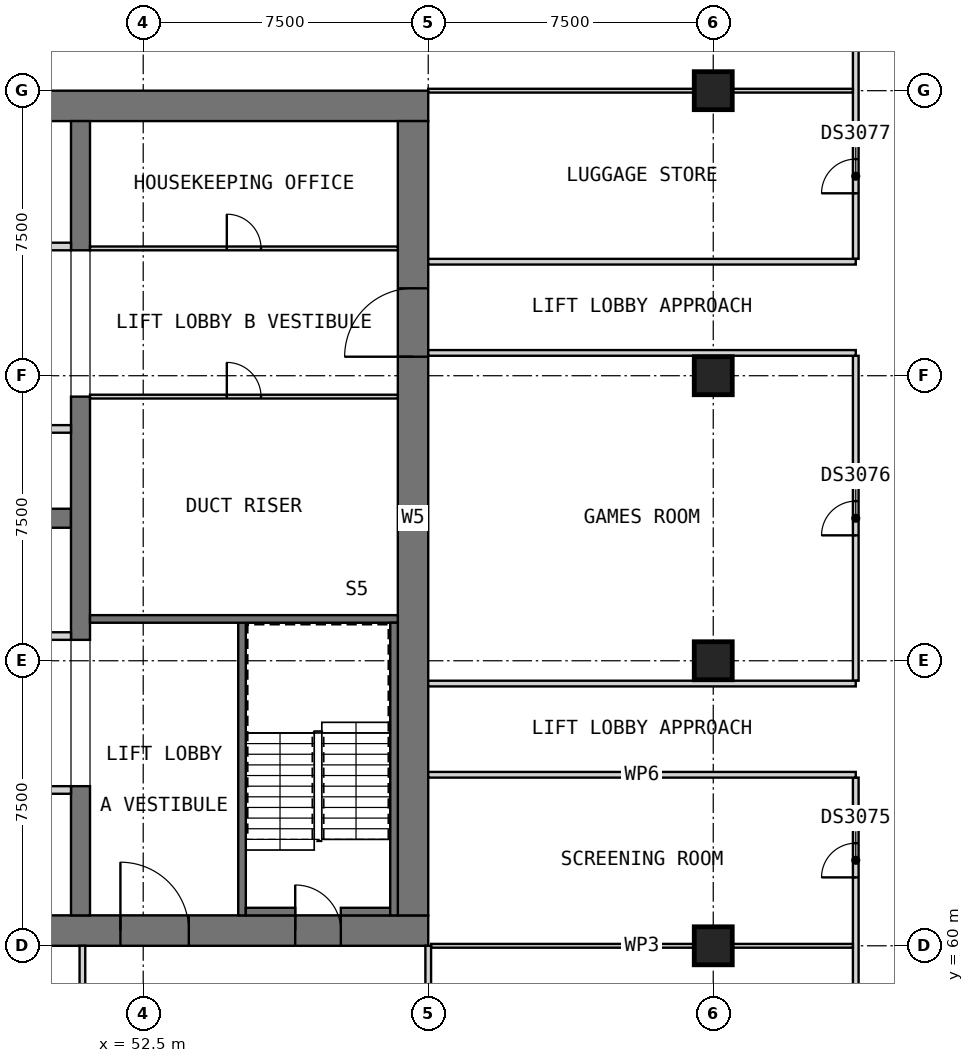
"""IFC4 building model, lengths in metres.
Left out: names, types, materials, properties, quantities, classifications, styles, units other than length and angle.
Written with IfcOpenShell. Run it as: python <this file> out.ifc"""

import sys

from ifc_helpers import new_model, si_unit, direction, frame, frame_2d, origin, origin_2d, place, context, subcontext, project, spatial, rectangle, extrude, element, fill, save


model = new_model("IFC4")
c1 = context("Model", 3, precision=1e-05, world=origin(), true_north=direction((0.0, 1.0)))
c2 = subcontext(c1, "Body", "Model", "MODEL_VIEW")
j1 = project(units=[si_unit("LENGTHUNIT", "METRE"), si_unit("PLANEANGLEUNIT", "RADIAN")], contexts=[c1])
p1 = place(None, origin())
s1 = spatial("IfcSite", under=j1, at=p1, CompositionType="ELEMENT")
p2 = place(p1, origin())
s2 = spatial("IfcBuilding", under=s1, at=p2, CompositionType="ELEMENT")
p3 = place(p2, frame((0.0, 0.0, 137.4)))
s3 = spatial("IfcBuildingStorey", under=s2, at=p3, CompositionType="ELEMENT", Elevation=137.4)
for number, where, z_axis, x_axis in (
    (1, (67.5, 60.0, 0.0), (0.0, 0.0, 1.0), (1.0, 0.0, 0.0)),
    (2, (67.5, 67.5, 0.0), (0.0, 0.0, 1.0), (1.0, 0.0, 0.0)),
    (3, (67.5, 75.0, 0.0), (0.0, 0.0, 1.0), (1.0, 0.0, 0.0)),
    (4, (67.5, 82.5, 0.0), (0.0, 0.0, 1.0), (1.0, 0.0, 0.0)),
):
    element("IfcColumn", number, at=place(p3, frame(where, z_axis=z_axis, x_axis=x_axis)), inside=s3, PredefinedType="COLUMN", context=c2, shape_type="SweptSolid", body=[
        extrude(rectangle(XDim=1.0, YDim=1.0, at=origin_2d()), origin(), (0.0, 0.0, 1.0), 3.6),
    ])
p4 = place(p3, frame((30.0, 60.4, 0.0), z_axis=(0.0, 0.0, 1.0), x_axis=(1.0, 0.0, 0.0)))
e5 = element("IfcWall", 5, at=p4, inside=s3, PredefinedType="SHEAR", context=c2, shape_type="SweptSolid", body=[
    extrude(rectangle(XDim=30.0, YDim=0.8, at=frame_2d((15.0, 0.0))), origin(), (0.0, 0.0, 1.0), 3.6),
])
p5 = place(p4, frame((21.9, 0.0, 0.0)))
e6 = element("IfcOpeningElement", 6, at=p5, cuts=e5, PredefinedType="OPENING", context=c2, shape_type="SweptSolid", body=[
    extrude(rectangle(XDim=1.8, YDim=2.1, at=frame_2d((0.9, 1.05))), frame((0.0, 0.41, 0.0), z_axis=(0.0, -1.0, 0.0), x_axis=(1.0, 0.0, 0.0)), (0.0, 0.0, 1.0), 0.82),
])
p6 = place(p4, frame((26.5, 0.0, 0.0)))
e7 = element("IfcOpeningElement", 7, at=p6, cuts=e5, PredefinedType="OPENING", context=c2, shape_type="SweptSolid", body=[
    extrude(rectangle(XDim=1.2, YDim=2.1, at=frame_2d((0.6, 1.05))), frame((0.0, 0.41, 0.0), z_axis=(0.0, -1.0, 0.0), x_axis=(1.0, 0.0, 0.0)), (0.0, 0.0, 1.0), 0.82),
])
p7 = place(p3, frame((30.0, 82.1, 0.0), z_axis=(0.0, 0.0, 1.0), x_axis=(1.0, 0.0, 0.0)))
e8 = element("IfcWall", 8, at=p7, inside=s3, PredefinedType="SHEAR", context=c2, shape_type="SweptSolid", body=[
    extrude(rectangle(XDim=30.0, YDim=0.8, at=frame_2d((15.0, 0.0))), origin(), (0.0, 0.0, 1.0), 3.6),
])
p8 = place(p3, frame((59.6, 60.8, 0.0), z_axis=(0.0, 0.0, 1.0), x_axis=(0.0, 1.0, 0.0)))
e9 = element("IfcWall", 9, at=p8, inside=s3, PredefinedType="SHEAR", context=c2, shape_type="SweptSolid", body=[
    extrude(rectangle(XDim=20.9, YDim=0.8, at=frame_2d((10.45, 0.0))), origin(), (0.0, 0.0, 1.0), 3.6),
])
p9 = place(p8, frame((14.7, 0.0, 0.0)))
e10 = element("IfcOpeningElement", 10, at=p9, cuts=e9, PredefinedType="OPENING", context=c2, shape_type="SweptSolid", body=[
    extrude(rectangle(XDim=1.8, YDim=2.1, at=frame_2d((0.9, 1.05))), frame((0.0, 0.41, 0.0), z_axis=(0.0, -1.0, 0.0), x_axis=(1.0, 0.0, 0.0)), (0.0, 0.0, 1.0), 0.82),
])
p10 = place(p3, frame((35.0, 71.25, 0.0), z_axis=(0.0, 0.0, 1.0), x_axis=(1.0, 0.0, 0.0)))
e11 = element("IfcWall", 11, at=p10, inside=s3, PredefinedType="SHEAR", context=c2, shape_type="SweptSolid", body=[
    extrude(rectangle(XDim=15.6, YDim=0.5, at=frame_2d((7.8, 0.0))), origin(), (0.0, 0.0, 1.0), 3.6),
])
p11 = place(p3, frame((50.85, 60.8, 0.0), z_axis=(0.0, 0.0, 1.0), x_axis=(0.0, 1.0, 0.0)))
e12 = element("IfcWall", 12, at=p11, inside=s3, PredefinedType="SHEAR", context=c2, shape_type="SweptSolid", body=[
    extrude(rectangle(XDim=3.4, YDim=0.5, at=frame_2d((1.7, 0.0))), origin(), (0.0, 0.0, 1.0), 3.6),
])
p12 = place(p3, frame((50.85, 68.05, 0.0), z_axis=(0.0, 0.0, 1.0), x_axis=(0.0, 1.0, 0.0)))
e13 = element("IfcWall", 13, at=p12, inside=s3, PredefinedType="SHEAR", context=c2, shape_type="SweptSolid", body=[
    extrude(rectangle(XDim=6.4, YDim=0.5, at=frame_2d((3.2, 0.0))), origin(), (0.0, 0.0, 1.0), 3.6),
])
p13 = place(p3, frame((50.85, 78.3, 0.0), z_axis=(0.0, 0.0, 1.0), x_axis=(0.0, 1.0, 0.0)))
e14 = element("IfcWall", 14, at=p13, inside=s3, PredefinedType="SHEAR", context=c2, shape_type="SweptSolid", body=[
    extrude(rectangle(XDim=3.4, YDim=0.5, at=frame_2d((1.7, 0.0))), origin(), (0.0, 0.0, 1.0), 3.6),
])
p14 = place(p3, frame((35.0, 64.1, 0.0), z_axis=(0.0, 0.0, 1.0), x_axis=(1.0, 0.0, 0.0)))
e15 = element("IfcWall", 15, at=p14, inside=s3, PredefinedType="PARTITIONING", context=c2, shape_type="SweptSolid", body=[
    extrude(rectangle(XDim=15.6, YDim=0.2, at=frame_2d((7.8, 0.0))), origin(), (0.0, 0.0, 1.0), 3.35),
])
p15 = place(p14, frame((2.625, 0.0, 0.0)))
e16 = element("IfcOpeningElement", 16, at=p15, cuts=e15, PredefinedType="OPENING", context=c2, shape_type="SweptSolid", body=[
    extrude(rectangle(XDim=0.9, YDim=2.1, at=frame_2d((0.45, 1.05))), frame((0.0, 0.11, 0.0), z_axis=(0.0, -1.0, 0.0), x_axis=(1.0, 0.0, 0.0)), (0.0, 0.0, 1.0), 0.22),
])
p16 = place(p14, frame((10.425, 0.0, 0.0)))
e17 = element("IfcOpeningElement", 17, at=p16, cuts=e15, PredefinedType="OPENING", context=c2, shape_type="SweptSolid", body=[
    extrude(rectangle(XDim=0.9, YDim=2.1, at=frame_2d((0.45, 1.05))), frame((0.0, 0.11, 0.0), z_axis=(0.0, -1.0, 0.0), x_axis=(1.0, 0.0, 0.0)), (0.0, 0.0, 1.0), 0.22),
])
p17 = place(p3, frame((35.0, 68.15, 0.0), z_axis=(0.0, 0.0, 1.0), x_axis=(1.0, 0.0, 0.0)))
e18 = element("IfcWall", 18, at=p17, inside=s3, PredefinedType="PARTITIONING", context=c2, shape_type="SweptSolid", body=[
    extrude(rectangle(XDim=15.6, YDim=0.2, at=frame_2d((7.8, 0.0))), origin(), (0.0, 0.0, 1.0), 3.35),
])
p18 = place(p17, frame((3.4, 0.0, 0.0)))
e19 = element("IfcOpeningElement", 19, at=p18, cuts=e18, PredefinedType="OPENING", context=c2, shape_type="SweptSolid", body=[
    extrude(rectangle(XDim=0.9, YDim=2.1, at=frame_2d((0.45, 1.05))), frame((0.0, 0.11, 0.0), z_axis=(0.0, -1.0, 0.0), x_axis=(1.0, 0.0, 0.0)), (0.0, 0.0, 1.0), 0.22),
])
p19 = place(p17, frame((11.2, 0.0, 0.0)))
e20 = element("IfcOpeningElement", 20, at=p19, cuts=e18, PredefinedType="OPENING", context=c2, shape_type="SweptSolid", body=[
    extrude(rectangle(XDim=0.9, YDim=2.1, at=frame_2d((0.45, 1.05))), frame((0.0, 0.11, 0.0), z_axis=(0.0, -1.0, 0.0), x_axis=(1.0, 0.0, 0.0)), (0.0, 0.0, 1.0), 0.22),
])
p20 = place(p3, frame((35.0, 73.6, 0.0), z_axis=(0.0, 0.0, 1.0), x_axis=(1.0, 0.0, 0.0)))
e21 = element("IfcWall", 21, at=p20, inside=s3, PredefinedType="SOLIDWALL", context=c2, shape_type="SweptSolid", body=[
    extrude(rectangle(XDim=15.6, YDim=0.2, at=frame_2d((7.8, 0.0))), origin(), (0.0, 0.0, 1.0), 3.6),
])
p21 = place(p20, frame((0.75, 0.0, 0.0)))
e22 = element("IfcOpeningElement", 22, at=p21, cuts=e21, PredefinedType="OPENING", context=c2, shape_type="SweptSolid", body=[
    extrude(rectangle(XDim=1.1, YDim=2.1, at=frame_2d((0.55, 1.05))), frame((0.0, 0.11, 0.0), z_axis=(0.0, -1.0, 0.0), x_axis=(1.0, 0.0, 0.0)), (0.0, 0.0, 1.0), 0.22),
])
p22 = place(p20, frame((3.35, 0.0, 0.0)))
e23 = element("IfcOpeningElement", 23, at=p22, cuts=e21, PredefinedType="OPENING", context=c2, shape_type="SweptSolid", body=[
    extrude(rectangle(XDim=1.1, YDim=2.1, at=frame_2d((0.55, 1.05))), frame((0.0, 0.11, 0.0), z_axis=(0.0, -1.0, 0.0), x_axis=(1.0, 0.0, 0.0)), (0.0, 0.0, 1.0), 0.22),
])
p23 = place(p20, frame((5.95, 0.0, 0.0)))
e24 = element("IfcOpeningElement", 24, at=p23, cuts=e21, PredefinedType="OPENING", context=c2, shape_type="SweptSolid", body=[
    extrude(rectangle(XDim=1.1, YDim=2.1, at=frame_2d((0.55, 1.05))), frame((0.0, 0.11, 0.0), z_axis=(0.0, -1.0, 0.0), x_axis=(1.0, 0.0, 0.0)), (0.0, 0.0, 1.0), 0.22),
])
p24 = place(p20, frame((8.55, 0.0, 0.0)))
e25 = element("IfcOpeningElement", 25, at=p24, cuts=e21, PredefinedType="OPENING", context=c2, shape_type="SweptSolid", body=[
    extrude(rectangle(XDim=1.1, YDim=2.1, at=frame_2d((0.55, 1.05))), frame((0.0, 0.11, 0.0), z_axis=(0.0, -1.0, 0.0), x_axis=(1.0, 0.0, 0.0)), (0.0, 0.0, 1.0), 0.22),
])
p25 = place(p20, frame((11.15, 0.0, 0.0)))
e26 = element("IfcOpeningElement", 26, at=p25, cuts=e21, PredefinedType="OPENING", context=c2, shape_type="SweptSolid", body=[
    extrude(rectangle(XDim=1.1, YDim=2.1, at=frame_2d((0.55, 1.05))), frame((0.0, 0.11, 0.0), z_axis=(0.0, -1.0, 0.0), x_axis=(1.0, 0.0, 0.0)), (0.0, 0.0, 1.0), 0.22),
])
p26 = place(p20, frame((13.75, 0.0, 0.0)))
e27 = element("IfcOpeningElement", 27, at=p26, cuts=e21, PredefinedType="OPENING", context=c2, shape_type="SweptSolid", body=[
    extrude(rectangle(XDim=1.1, YDim=2.1, at=frame_2d((0.55, 1.05))), frame((0.0, 0.11, 0.0), z_axis=(0.0, -1.0, 0.0), x_axis=(1.0, 0.0, 0.0)), (0.0, 0.0, 1.0), 0.22),
])
p27 = place(p3, frame((35.0, 78.4, 0.0), z_axis=(0.0, 0.0, 1.0), x_axis=(1.0, 0.0, 0.0)))
e28 = element("IfcWall", 28, at=p27, inside=s3, PredefinedType="SOLIDWALL", context=c2, shape_type="SweptSolid", body=[
    extrude(rectangle(XDim=15.6, YDim=0.2, at=frame_2d((7.8, 0.0))), origin(), (0.0, 0.0, 1.0), 3.6),
])
p28 = place(p27, frame((0.75, 0.0, 0.0)))
e29 = element("IfcOpeningElement", 29, at=p28, cuts=e28, PredefinedType="OPENING", context=c2, shape_type="SweptSolid", body=[
    extrude(rectangle(XDim=1.1, YDim=2.1, at=frame_2d((0.55, 1.05))), frame((0.0, 0.11, 0.0), z_axis=(0.0, -1.0, 0.0), x_axis=(1.0, 0.0, 0.0)), (0.0, 0.0, 1.0), 0.22),
])
p29 = place(p27, frame((3.35, 0.0, 0.0)))
e30 = element("IfcOpeningElement", 30, at=p29, cuts=e28, PredefinedType="OPENING", context=c2, shape_type="SweptSolid", body=[
    extrude(rectangle(XDim=1.1, YDim=2.1, at=frame_2d((0.55, 1.05))), frame((0.0, 0.11, 0.0), z_axis=(0.0, -1.0, 0.0), x_axis=(1.0, 0.0, 0.0)), (0.0, 0.0, 1.0), 0.22),
])
p30 = place(p27, frame((11.15, 0.0, 0.0)))
e31 = element("IfcOpeningElement", 31, at=p30, cuts=e28, PredefinedType="OPENING", context=c2, shape_type="SweptSolid", body=[
    extrude(rectangle(XDim=1.1, YDim=2.1, at=frame_2d((0.55, 1.05))), frame((0.0, 0.11, 0.0), z_axis=(0.0, -1.0, 0.0), x_axis=(1.0, 0.0, 0.0)), (0.0, 0.0, 1.0), 0.22),
])
p31 = place(p27, frame((13.75, 0.0, 0.0)))
e32 = element("IfcOpeningElement", 32, at=p31, cuts=e28, PredefinedType="OPENING", context=c2, shape_type="SweptSolid", body=[
    extrude(rectangle(XDim=1.1, YDim=2.1, at=frame_2d((0.55, 1.05))), frame((0.0, 0.11, 0.0), z_axis=(0.0, -1.0, 0.0), x_axis=(1.0, 0.0, 0.0)), (0.0, 0.0, 1.0), 0.22),
])
p32 = place(p3, frame((55.1, 60.8, 0.0), z_axis=(0.0, 0.0, 1.0), x_axis=(0.0, 1.0, 0.0)))
e33 = element("IfcWall", 33, at=p32, inside=s3, PredefinedType="SOLIDWALL", context=c2, shape_type="SweptSolid", body=[
    extrude(rectangle(XDim=7.8, YDim=0.2, at=frame_2d((3.9, 0.0))), origin(), (0.0, 0.0, 1.0), 3.35),
])
p33 = place(p3, frame((51.1, 68.6, 0.0), z_axis=(0.0, 0.0, 1.0), x_axis=(1.0, 0.0, 0.0)))
e34 = element("IfcWall", 34, at=p33, inside=s3, PredefinedType="SOLIDWALL", context=c2, shape_type="SweptSolid", body=[
    extrude(rectangle(XDim=8.1, YDim=0.2, at=frame_2d((4.05, 0.0))), origin(), (0.0, 0.0, 1.0), 3.35),
])
for number, where, z_axis, x_axis in (
    (35, (55.2, 60.9, 0.0), (0.0, 0.0, 1.0), (1.0, 0.0, 0.0)),
    (36, (57.7, 60.9, 0.0), (0.0, 0.0, 1.0), (1.0, 0.0, 0.0)),
):
    element("IfcWall", number, at=place(p3, frame(where, z_axis=z_axis, x_axis=x_axis)), inside=s3, PredefinedType="SOLIDWALL", context=c2, shape_type="SweptSolid", body=[
        extrude(rectangle(XDim=1.3, YDim=0.2, at=frame_2d((0.65, 0.0))), origin(), (0.0, 0.0, 1.0), 3.35),
    ])
p34 = place(p3, frame((59.1, 60.8, 0.0), z_axis=(0.0, 0.0, 1.0), x_axis=(0.0, 1.0, 0.0)))
e37 = element("IfcWall", 37, at=p34, inside=s3, PredefinedType="SOLIDWALL", context=c2, shape_type="SweptSolid", body=[
    extrude(rectangle(XDim=7.7, YDim=0.2, at=frame_2d((3.85, 0.0))), origin(), (0.0, 0.0, 1.0), 3.35),
])
p35 = place(p3, frame((51.1, 74.45, 0.0), z_axis=(0.0, 0.0, 1.0), x_axis=(1.0, 0.0, 0.0)))
e38 = element("IfcWall", 38, at=p35, inside=s3, PredefinedType="PARTITIONING", context=c2, shape_type="SweptSolid", body=[
    extrude(rectangle(XDim=8.1, YDim=0.1, at=frame_2d((4.05, 0.0))), origin(), (0.0, 0.0, 1.0), 3.35),
])
p36 = place(p35, frame((3.6, 0.0, 0.0)))
e39 = element("IfcOpeningElement", 39, at=p36, cuts=e38, PredefinedType="OPENING", context=c2, shape_type="SweptSolid", body=[
    extrude(rectangle(XDim=0.9, YDim=2.1, at=frame_2d((0.45, 1.05))), frame((0.0, 0.06, 0.0), z_axis=(0.0, -1.0, 0.0), x_axis=(1.0, 0.0, 0.0)), (0.0, 0.0, 1.0), 0.12),
])
p37 = place(p3, frame((51.1, 78.35, 0.0), z_axis=(0.0, 0.0, 1.0), x_axis=(1.0, 0.0, 0.0)))
e40 = element("IfcWall", 40, at=p37, inside=s3, PredefinedType="PARTITIONING", context=c2, shape_type="SweptSolid", body=[
    extrude(rectangle(XDim=8.1, YDim=0.1, at=frame_2d((4.05, 0.0))), origin(), (0.0, 0.0, 1.0), 3.35),
])
p38 = place(p37, frame((3.6, 0.0, 0.0)))
e41 = element("IfcOpeningElement", 41, at=p38, cuts=e40, PredefinedType="OPENING", context=c2, shape_type="SweptSolid", body=[
    extrude(rectangle(XDim=0.9, YDim=2.1, at=frame_2d((0.45, 1.05))), frame((0.0, 0.06, 0.0), z_axis=(0.0, -1.0, 0.0), x_axis=(1.0, 0.0, 0.0)), (0.0, 0.0, 1.0), 0.12),
])
p39 = place(p3, frame((71.25, 52.575, 0.0), z_axis=(0.0, 0.0, 1.0), x_axis=(0.0, 1.0, 0.0)))
e42 = element("IfcWall", 42, at=p39, inside=s3, PredefinedType="PARTITIONING", context=c2, shape_type="SweptSolid", body=[
    extrude(rectangle(XDim=11.85, YDim=0.15, at=frame_2d((5.925, 0.0))), origin(), (0.0, 0.0, 1.0), 3.35),
])
p40 = place(p39, frame((9.225, 0.0, 0.0)))
e43 = element("IfcOpeningElement", 43, at=p40, cuts=e42, PredefinedType="OPENING", context=c2, shape_type="SweptSolid", body=[
    extrude(rectangle(XDim=0.9, YDim=2.1, at=frame_2d((0.45, 1.05))), frame((0.0, 0.085, 0.0), z_axis=(0.0, -1.0, 0.0), x_axis=(1.0, 0.0, 0.0)), (0.0, 0.0, 1.0), 0.17),
])
p41 = place(p3, frame((71.25, 66.975, 0.0), z_axis=(0.0, 0.0, 1.0), x_axis=(0.0, 1.0, 0.0)))
e44 = element("IfcWall", 44, at=p41, inside=s3, PredefinedType="PARTITIONING", context=c2, shape_type="SweptSolid", body=[
    extrude(rectangle(XDim=8.55, YDim=0.15, at=frame_2d((4.275, 0.0))), origin(), (0.0, 0.0, 1.0), 3.35),
])
p42 = place(p41, frame((3.825, 0.0, 0.0)))
e45 = element("IfcOpeningElement", 45, at=p42, cuts=e44, PredefinedType="OPENING", context=c2, shape_type="SweptSolid", body=[
    extrude(rectangle(XDim=0.9, YDim=2.1, at=frame_2d((0.45, 1.05))), frame((0.0, 0.085, 0.0), z_axis=(0.0, -1.0, 0.0), x_axis=(1.0, 0.0, 0.0)), (0.0, 0.0, 1.0), 0.17),
])
p43 = place(p3, frame((71.25, 78.075, 0.0), z_axis=(0.0, 0.0, 1.0), x_axis=(0.0, 1.0, 0.0)))
e46 = element("IfcWall", 46, at=p43, inside=s3, PredefinedType="PARTITIONING", context=c2, shape_type="SweptSolid", body=[
    extrude(rectangle(XDim=8.1, YDim=0.15, at=frame_2d((4.05, 0.0))), origin(), (0.0, 0.0, 1.0), 3.35),
])
p44 = place(p43, frame((5.85, 0.0, 0.0)))
e47 = element("IfcOpeningElement", 47, at=p44, cuts=e46, PredefinedType="OPENING", context=c2, shape_type="SweptSolid", body=[
    extrude(rectangle(XDim=0.9, YDim=2.1, at=frame_2d((0.45, 1.05))), frame((0.0, 0.085, 0.0), z_axis=(0.0, -1.0, 0.0), x_axis=(1.0, 0.0, 0.0)), (0.0, 0.0, 1.0), 0.17),
])
p45 = place(p43, frame((1.725, 0.0, 0.0)))
e48 = element("IfcOpeningElement", 48, at=p45, cuts=e46, PredefinedType="OPENING", context=c2, shape_type="SweptSolid", body=[
    extrude(rectangle(XDim=0.9, YDim=2.1, at=frame_2d((0.45, 1.05))), frame((0.0, 0.085, 0.0), z_axis=(0.0, -1.0, 0.0), x_axis=(1.0, 0.0, 0.0)), (0.0, 0.0, 1.0), 0.17),
])
p46 = place(p3, frame((60.075, 60.0, 0.0), z_axis=(0.0, 0.0, 1.0), x_axis=(1.0, 0.0, 0.0)))
e49 = element("IfcWall", 49, at=p46, inside=s3, PredefinedType="PARTITIONING", context=c2, shape_type="SweptSolid", body=[
    extrude(rectangle(XDim=11.1, YDim=0.1, at=frame_2d((5.55, 0.0))), origin(), (0.0, 0.0, 1.0), 3.35),
])
p47 = place(p3, frame((60.0, 82.5, 0.0), z_axis=(0.0, 0.0, 1.0), x_axis=(1.0, 0.0, 0.0)))
e50 = element("IfcWall", 50, at=p47, inside=s3, PredefinedType="PARTITIONING", context=c2, shape_type="SweptSolid", body=[
    extrude(rectangle(XDim=11.175, YDim=0.1, at=frame_2d((5.587, 0.0))), origin(), (0.0, 0.0, 1.0), 3.35),
])
for number, where, z_axis, x_axis in (
    (51, (60.0, 64.5, 0.0), (0.0, 0.0, 1.0), (1.0, 0.0, 0.0)),
    (52, (60.0, 66.9, 0.0), (0.0, 0.0, 1.0), (1.0, 0.0, 0.0)),
    (53, (60.0, 75.6, 0.0), (0.0, 0.0, 1.0), (1.0, 0.0, 0.0)),
    (54, (60.0, 78.0, 0.0), (0.0, 0.0, 1.0), (1.0, 0.0, 0.0)),
):
    element("IfcWall", number, at=place(p3, frame(where, z_axis=z_axis, x_axis=x_axis)), inside=s3, PredefinedType="PARTITIONING", context=c2, shape_type="SweptSolid", body=[
        extrude(rectangle(XDim=11.25, YDim=0.15, at=frame_2d((5.625, 0.0))), origin(), (0.0, 0.0, 1.0), 3.35),
    ])
for number, where, z_axis, x_axis in (
    (55, (50.9, 52.575, 0.0), (0.0, 0.0, 1.0), (0.0, 1.0, 0.0)),
    (56, (60.0, 52.575, 0.0), (0.0, 0.0, 1.0), (0.0, 1.0, 0.0)),
):
    element("IfcWall", number, at=place(p3, frame(where, z_axis=z_axis, x_axis=x_axis)), inside=s3, PredefinedType="PARTITIONING", context=c2, shape_type="SweptSolid", body=[
        extrude(rectangle(XDim=7.425, YDim=0.15, at=frame_2d((3.712, 0.0))), origin(), (0.0, 0.0, 1.0), 3.35),
    ])
p48 = place(p5, origin())
e57 = element("IfcDoor", 57, at=p48, inside=s3, OperationType="DOUBLE_DOOR_SINGLE_SWING", PredefinedType="DOOR", context=c2, shape_type="SweptSolid", body=[
    extrude(rectangle(XDim=1.8, YDim=2.1, at=frame_2d((0.9, 1.05))), frame((0.0, 0.025, 0.0), z_axis=(0.0, -1.0, 0.0), x_axis=(1.0, 0.0, 0.0)), (0.0, 0.0, 1.0), 0.05),
])
fill(e6, e57)
p49 = place(p9, origin())
e58 = element("IfcDoor", 58, at=p49, inside=s3, OperationType="DOUBLE_DOOR_SINGLE_SWING", PredefinedType="DOOR", context=c2, shape_type="SweptSolid", body=[
    extrude(rectangle(XDim=1.8, YDim=2.1, at=frame_2d((0.9, 1.05))), frame((0.0, 0.025, 0.0), z_axis=(0.0, -1.0, 0.0), x_axis=(1.0, 0.0, 0.0)), (0.0, 0.0, 1.0), 0.05),
])
fill(e10, e58)
p50 = place(p6, origin())
e59 = element("IfcDoor", 59, at=p50, inside=s3, OperationType="SINGLE_SWING_LEFT", PredefinedType="DOOR", context=c2, shape_type="SweptSolid", body=[
    extrude(rectangle(XDim=1.2, YDim=2.1, at=frame_2d((0.6, 1.05))), frame((0.0, 0.025, 0.0), z_axis=(0.0, -1.0, 0.0), x_axis=(1.0, 0.0, 0.0)), (0.0, 0.0, 1.0), 0.05),
])
fill(e7, e59)
p51 = place(p36, origin())
e60 = element("IfcDoor", 60, at=p51, inside=s3, OperationType="SINGLE_SWING_LEFT", PredefinedType="DOOR", context=c2, shape_type="SweptSolid", body=[
    extrude(rectangle(XDim=0.9, YDim=2.1, at=frame_2d((0.45, 1.05))), frame((0.0, 0.025, 0.0), z_axis=(0.0, -1.0, 0.0), x_axis=(1.0, 0.0, 0.0)), (0.0, 0.0, 1.0), 0.05),
])
fill(e39, e60)
p52 = place(p38, origin())
e61 = element("IfcDoor", 61, at=p52, inside=s3, OperationType="SINGLE_SWING_LEFT", PredefinedType="DOOR", context=c2, shape_type="SweptSolid", body=[
    extrude(rectangle(XDim=0.9, YDim=2.1, at=frame_2d((0.45, 1.05))), frame((0.0, 0.025, 0.0), z_axis=(0.0, -1.0, 0.0), x_axis=(1.0, 0.0, 0.0)), (0.0, 0.0, 1.0), 0.05),
])
fill(e41, e61)
p53 = place(p40, origin())
e62 = element("IfcDoor", 62, at=p53, inside=s3, OperationType="SINGLE_SWING_LEFT", PredefinedType="DOOR", context=c2, shape_type="SweptSolid", body=[
    extrude(rectangle(XDim=0.9, YDim=2.1, at=frame_2d((0.45, 1.05))), frame((0.0, 0.025, 0.0), z_axis=(0.0, -1.0, 0.0), x_axis=(1.0, 0.0, 0.0)), (0.0, 0.0, 1.0), 0.05),
])
fill(e43, e62)
p54 = place(p42, origin())
e63 = element("IfcDoor", 63, at=p54, inside=s3, OperationType="SINGLE_SWING_LEFT", PredefinedType="DOOR", context=c2, shape_type="SweptSolid", body=[
    extrude(rectangle(XDim=0.9, YDim=2.1, at=frame_2d((0.45, 1.05))), frame((0.0, 0.025, 0.0), z_axis=(0.0, -1.0, 0.0), x_axis=(1.0, 0.0, 0.0)), (0.0, 0.0, 1.0), 0.05),
])
fill(e45, e63)
p55 = place(p45, origin())
e64 = element("IfcDoor", 64, at=p55, inside=s3, OperationType="SINGLE_SWING_LEFT", PredefinedType="DOOR", context=c2, shape_type="SweptSolid", body=[
    extrude(rectangle(XDim=0.9, YDim=2.1, at=frame_2d((0.45, 1.05))), frame((0.0, 0.025, 0.0), z_axis=(0.0, -1.0, 0.0), x_axis=(1.0, 0.0, 0.0)), (0.0, 0.0, 1.0), 0.05),
])
fill(e48, e64)
save(model, sys.argv[1])
